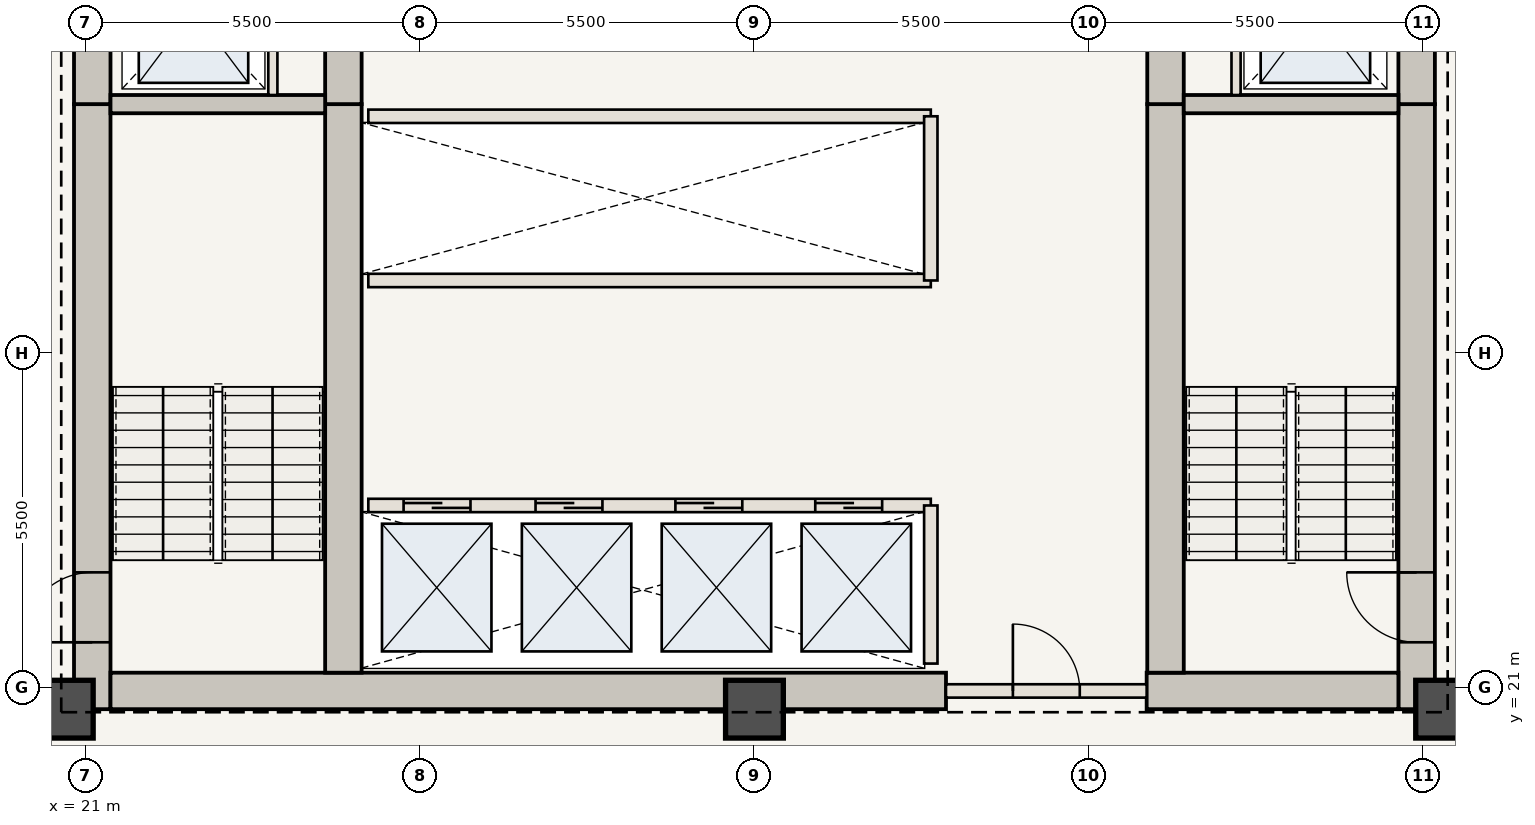
"""IFC4 building model, lengths in metres.
Left out: names, types, materials, properties, quantities, classifications, styles, units other than length and angle.
Written with IfcOpenShell. Run it as: python <this file> out.ifc"""

import sys

from ifc_helpers import new_model, si_unit, direction, frame, frame_2d, origin, origin_2d, place, context, subcontext, project, spatial, rectangle, extrude, element, fill, save


model = new_model("IFC4")
c1 = context("Model", 3, precision=1e-05, world=origin(), true_north=direction((0.0, 1.0)))
c2 = subcontext(c1, "Body", "Model", "MODEL_VIEW")
j1 = project(units=[si_unit("LENGTHUNIT", "METRE"), si_unit("PLANEANGLEUNIT", "RADIAN")], contexts=[c1])
p1 = place(None, origin())
s1 = spatial("IfcSite", under=j1, at=p1, CompositionType="ELEMENT")
p2 = place(p1, origin())
s2 = spatial("IfcBuilding", under=s1, at=p2, CompositionType="ELEMENT")
p3 = place(p2, frame((0.0, 0.0, 172.2)))
s3 = spatial("IfcBuildingStorey", under=s2, at=p3, CompositionType="ELEMENT", Elevation=172.2)
p4 = place(p3, frame((21.11, 20.65, 0.0), z_axis=(0.0, 0.0, 1.0), x_axis=(0.0, 1.0, 0.0)))
e1 = element("IfcWall", 1, at=p4, inside=s3, PredefinedType="SHEAR", context=c2, shape_type="SweptSolid", body=[
    extrude(rectangle(XDim=9.95, YDim=0.6, at=frame_2d((4.975, 0.0))), origin(), (0.0, 0.0, 1.0), 3.85),
])
p5 = place(p4, frame((1.1, 0.0, 0.0)))
e2 = element("IfcOpeningElement", 2, at=p5, cuts=e1, PredefinedType="OPENING", context=c2, shape_type="SweptSolid", body=[
    extrude(rectangle(XDim=1.15, YDim=2.15, at=frame_2d((0.575, 1.075))), frame((0.0, 0.31, 0.0), z_axis=(0.0, -1.0, 0.0), x_axis=(1.0, 0.0, 0.0)), (0.0, 0.0, 1.0), 0.62),
])
p6 = place(p3, frame((21.11, 30.6, 0.0), z_axis=(0.0, 0.0, 1.0), x_axis=(0.0, 1.0, 0.0)))
e3 = element("IfcWall", 3, at=p6, inside=s3, PredefinedType="SHEAR", context=c2, shape_type="SweptSolid", body=[
    extrude(rectangle(XDim=12.7, YDim=0.6, at=frame_2d((6.35, 0.0))), origin(), (0.0, 0.0, 1.0), 3.85),
])
p7 = place(p6, frame((4.2, 0.0, 0.0)))
e4 = element("IfcOpeningElement", 4, at=p7, cuts=e3, PredefinedType="OPENING", context=c2, shape_type="SweptSolid", body=[
    extrude(rectangle(XDim=1.1, YDim=2.15, at=frame_2d((0.55, 1.075))), frame((0.0, 0.31, 0.0), z_axis=(0.0, -1.0, 0.0), x_axis=(1.0, 0.0, 0.0)), (0.0, 0.0, 1.0), 0.62),
])
p8 = place(p6, frame((9.2, 0.0, 0.0)))
e5 = element("IfcOpeningElement", 5, at=p8, cuts=e3, PredefinedType="OPENING", context=c2, shape_type="SweptSolid", body=[
    extrude(rectangle(XDim=0.92, YDim=2.1, at=frame_2d((0.46, 1.05))), frame((0.0, 0.31, 0.0), z_axis=(0.0, -1.0, 0.0), x_axis=(1.0, 0.0, 0.0)), (0.0, 0.0, 1.0), 0.62),
])
p9 = place(p3, frame((42.89, 20.65, 0.0), z_axis=(0.0, 0.0, 1.0), x_axis=(0.0, 1.0, 0.0)))
e6 = element("IfcWall", 6, at=p9, inside=s3, PredefinedType="SHEAR", context=c2, shape_type="SweptSolid", body=[
    extrude(rectangle(XDim=9.95, YDim=0.6, at=frame_2d((4.975, 0.0))), origin(), (0.0, 0.0, 1.0), 3.85),
])
p10 = place(p9, frame((1.1, 0.0, 0.0)))
e7 = element("IfcOpeningElement", 7, at=p10, cuts=e6, PredefinedType="OPENING", context=c2, shape_type="SweptSolid", body=[
    extrude(rectangle(XDim=1.15, YDim=2.15, at=frame_2d((0.575, 1.075))), frame((0.0, 0.31, 0.0), z_axis=(0.0, -1.0, 0.0), x_axis=(1.0, 0.0, 0.0)), (0.0, 0.0, 1.0), 0.62),
])
p11 = place(p3, frame((42.89, 30.6, 0.0), z_axis=(0.0, 0.0, 1.0), x_axis=(0.0, 1.0, 0.0)))
e8 = element("IfcWall", 8, at=p11, inside=s3, PredefinedType="SHEAR", context=c2, shape_type="SweptSolid", body=[
    extrude(rectangle(XDim=12.7, YDim=0.6, at=frame_2d((6.35, 0.0))), origin(), (0.0, 0.0, 1.0), 3.85),
])
p12 = place(p11, frame((4.2, 0.0, 0.0)))
e9 = element("IfcOpeningElement", 9, at=p12, cuts=e8, PredefinedType="OPENING", context=c2, shape_type="SweptSolid", body=[
    extrude(rectangle(XDim=1.1, YDim=2.15, at=frame_2d((0.55, 1.075))), frame((0.0, 0.31, 0.0), z_axis=(0.0, -1.0, 0.0), x_axis=(1.0, 0.0, 0.0)), (0.0, 0.0, 1.0), 0.62),
])
p13 = place(p11, frame((8.05, 0.0, 0.0)))
e10 = element("IfcOpeningElement", 10, at=p13, cuts=e8, PredefinedType="OPENING", context=c2, shape_type="SweptSolid", body=[
    extrude(rectangle(XDim=0.88, YDim=2.1, at=frame_2d((0.44, 1.05))), frame((0.0, 0.31, 0.0), z_axis=(0.0, -1.0, 0.0), x_axis=(1.0, 0.0, 0.0)), (0.0, 0.0, 1.0), 0.62),
])
p14 = place(p11, frame((9.45, 0.0, 0.0)))
e11 = element("IfcOpeningElement", 11, at=p14, cuts=e8, PredefinedType="OPENING", context=c2, shape_type="SweptSolid", body=[
    extrude(rectangle(XDim=0.88, YDim=2.1, at=frame_2d((0.44, 1.05))), frame((0.0, 0.31, 0.0), z_axis=(0.0, -1.0, 0.0), x_axis=(1.0, 0.0, 0.0)), (0.0, 0.0, 1.0), 0.62),
])
p15 = place(p11, frame((10.85, 0.0, 0.0)))
e12 = element("IfcOpeningElement", 12, at=p15, cuts=e8, PredefinedType="OPENING", context=c2, shape_type="SweptSolid", body=[
    extrude(rectangle(XDim=0.88, YDim=2.1, at=frame_2d((0.44, 1.05))), frame((0.0, 0.31, 0.0), z_axis=(0.0, -1.0, 0.0), x_axis=(1.0, 0.0, 0.0)), (0.0, 0.0, 1.0), 0.62),
])
p16 = place(p3, frame((21.41, 20.95, 0.0), z_axis=(0.0, 0.0, 1.0), x_axis=(1.0, 0.0, 0.0)))
e13 = element("IfcWall", 13, at=p16, inside=s3, PredefinedType="SHEAR", context=c2, shape_type="SweptSolid", body=[
    extrude(rectangle(XDim=13.74, YDim=0.6, at=frame_2d((6.87, 0.0))), origin(), (0.0, 0.0, 1.0), 3.85),
])
p17 = place(p3, frame((38.45, 20.95, 0.0), z_axis=(0.0, 0.0, 1.0), x_axis=(1.0, 0.0, 0.0)))
e14 = element("IfcWall", 14, at=p17, inside=s3, PredefinedType="SHEAR", context=c2, shape_type="SweptSolid", body=[
    extrude(rectangle(XDim=4.14, YDim=0.6, at=frame_2d((2.07, 0.0))), origin(), (0.0, 0.0, 1.0), 3.85),
])
p18 = place(p3, frame((25.24, 21.25, 0.0), z_axis=(0.0, 0.0, 1.0), x_axis=(0.0, 1.0, 0.0)))
e15 = element("IfcWall", 15, at=p18, inside=s3, PredefinedType="SHEAR", context=c2, shape_type="SweptSolid", body=[
    extrude(rectangle(XDim=9.35, YDim=0.6, at=frame_2d((4.675, 0.0))), origin(), (0.0, 0.0, 1.0), 3.85),
])
p19 = place(p3, frame((25.24, 30.6, 0.0), z_axis=(0.0, 0.0, 1.0), x_axis=(0.0, 1.0, 0.0)))
e16 = element("IfcWall", 16, at=p19, inside=s3, PredefinedType="SHEAR", context=c2, shape_type="SweptSolid", body=[
    extrude(rectangle(XDim=12.1, YDim=0.6, at=frame_2d((6.05, 0.0))), origin(), (0.0, 0.0, 1.0), 3.85),
])
p20 = place(p19, frame((6.25, 0.0, 0.0)))
e17 = element("IfcOpeningElement", 17, at=p20, cuts=e16, PredefinedType="OPENING", context=c2, shape_type="SweptSolid", body=[
    extrude(rectangle(XDim=1.1, YDim=2.15, at=frame_2d((0.55, 1.075))), frame((0.0, 0.31, 0.0), z_axis=(0.0, -1.0, 0.0), x_axis=(1.0, 0.0, 0.0)), (0.0, 0.0, 1.0), 0.62),
])
p21 = place(p3, frame((38.76, 21.25, 0.0), z_axis=(0.0, 0.0, 1.0), x_axis=(0.0, 1.0, 0.0)))
e18 = element("IfcWall", 18, at=p21, inside=s3, PredefinedType="SHEAR", context=c2, shape_type="SweptSolid", body=[
    extrude(rectangle(XDim=9.35, YDim=0.6, at=frame_2d((4.675, 0.0))), origin(), (0.0, 0.0, 1.0), 3.85),
])
p22 = place(p3, frame((38.76, 30.6, 0.0), z_axis=(0.0, 0.0, 1.0), x_axis=(0.0, 1.0, 0.0)))
e19 = element("IfcWall", 19, at=p22, inside=s3, PredefinedType="SHEAR", context=c2, shape_type="SweptSolid", body=[
    extrude(rectangle(XDim=12.1, YDim=0.6, at=frame_2d((6.05, 0.0))), origin(), (0.0, 0.0, 1.0), 3.85),
])
for number, where, z_axis, x_axis in (
    (20, (20.65, 20.65, 0.0), (0.0, 0.0, 1.0), (1.0, 0.0, 0.0)),
    (21, (32.0, 20.65, 0.0), (0.0, 0.0, 1.0), (1.0, 0.0, 0.0)),
    (22, (43.35, 20.65, 0.0), (0.0, 0.0, 1.0), (1.0, 0.0, 0.0)),
):
    element("IfcColumn", number, at=place(p3, frame(where, z_axis=z_axis, x_axis=x_axis)), inside=s3, PredefinedType="COLUMN", context=c2, shape_type="SweptSolid", body=[
        extrude(rectangle(XDim=0.95, YDim=0.95, at=origin_2d()), origin(), (0.0, 0.0, 1.0), 3.85),
    ])
for number, where, z_axis, x_axis in (
    (23, (21.41, 30.6, 0.0), (0.0, 0.0, 1.0), (1.0, 0.0, 0.0)),
    (24, (39.06, 30.6, 0.0), (0.0, 0.0, 1.0), (1.0, 0.0, 0.0)),
):
    element("IfcWall", number, at=place(p3, frame(where, z_axis=z_axis, x_axis=x_axis)), inside=s3, PredefinedType="SHEAR", context=c2, shape_type="SweptSolid", body=[
        extrude(rectangle(XDim=3.53, YDim=0.3, at=frame_2d((1.765, 0.0))), origin(), (0.0, 0.0, 1.0), 3.43),
    ])
for number, where, z_axis, x_axis in (
    (25, (24.08, 30.75, 0.0), (0.0, 0.0, 1.0), (0.0, 1.0, 0.0)),
    (26, (39.92, 30.75, 0.0), (0.0, 0.0, 1.0), (0.0, 1.0, 0.0)),
):
    element("IfcWall", number, at=place(p3, frame(where, z_axis=z_axis, x_axis=x_axis)), inside=s3, PredefinedType="STANDARD", context=c2, shape_type="SweptSolid", body=[
        extrude(rectangle(XDim=2.65, YDim=0.15, at=frame_2d((1.325, 0.0))), origin(), (0.0, 0.0, 1.0), 3.43),
    ])
p23 = place(p3, frame((35.15, 20.95, 0.0), z_axis=(0.0, 0.0, 1.0), x_axis=(1.0, 0.0, 0.0)))
e27 = element("IfcWall", 27, at=p23, inside=s3, PredefinedType="STANDARD", context=c2, shape_type="SweptSolid", body=[
    extrude(rectangle(XDim=3.3, YDim=0.22, at=frame_2d((1.65, 0.0))), origin(), (0.0, 0.0, 1.0), 3.43),
])
p24 = place(p23, frame((1.1, 0.0, 0.0)))
e28 = element("IfcOpeningElement", 28, at=p24, cuts=e27, PredefinedType="OPENING", context=c2, shape_type="SweptSolid", body=[
    extrude(rectangle(XDim=1.1, YDim=2.15, at=frame_2d((0.55, 1.075))), frame((0.0, 0.12, 0.0), z_axis=(0.0, -1.0, 0.0), x_axis=(1.0, 0.0, 0.0)), (0.0, 0.0, 1.0), 0.24),
])
p25 = place(p3, frame((25.65, 24.0, 0.0), z_axis=(0.0, 0.0, 1.0), x_axis=(1.0, 0.0, 0.0)))
e29 = element("IfcWall", 29, at=p25, inside=s3, PredefinedType="STANDARD", context=c2, shape_type="SweptSolid", body=[
    extrude(rectangle(XDim=9.25, YDim=0.22, at=frame_2d((4.625, 0.0))), origin(), (0.0, 0.0, 1.0), 3.43),
])
p26 = place(p25, frame((0.58, 0.0, 0.0)))
e30 = element("IfcOpeningElement", 30, at=p26, cuts=e29, PredefinedType="OPENING", context=c2, shape_type="SweptSolid", body=[
    extrude(rectangle(XDim=1.1, YDim=2.15, at=frame_2d((0.55, 1.075))), frame((0.0, 0.12, 0.0), z_axis=(0.0, -1.0, 0.0), x_axis=(1.0, 0.0, 0.0)), (0.0, 0.0, 1.0), 0.24),
])
p27 = place(p25, frame((2.75, 0.0, 0.0)))
e31 = element("IfcOpeningElement", 31, at=p27, cuts=e29, PredefinedType="OPENING", context=c2, shape_type="SweptSolid", body=[
    extrude(rectangle(XDim=1.1, YDim=2.15, at=frame_2d((0.55, 1.075))), frame((0.0, 0.12, 0.0), z_axis=(0.0, -1.0, 0.0), x_axis=(1.0, 0.0, 0.0)), (0.0, 0.0, 1.0), 0.24),
])
p28 = place(p25, frame((5.05, 0.0, 0.0)))
e32 = element("IfcOpeningElement", 32, at=p28, cuts=e29, PredefinedType="OPENING", context=c2, shape_type="SweptSolid", body=[
    extrude(rectangle(XDim=1.1, YDim=2.15, at=frame_2d((0.55, 1.075))), frame((0.0, 0.12, 0.0), z_axis=(0.0, -1.0, 0.0), x_axis=(1.0, 0.0, 0.0)), (0.0, 0.0, 1.0), 0.24),
])
p29 = place(p25, frame((7.35, 0.0, 0.0)))
e33 = element("IfcOpeningElement", 33, at=p29, cuts=e29, PredefinedType="OPENING", context=c2, shape_type="SweptSolid", body=[
    extrude(rectangle(XDim=1.1, YDim=2.15, at=frame_2d((0.55, 1.075))), frame((0.0, 0.12, 0.0), z_axis=(0.0, -1.0, 0.0), x_axis=(1.0, 0.0, 0.0)), (0.0, 0.0, 1.0), 0.24),
])
p30 = place(p3, frame((34.9, 21.4, 0.0), z_axis=(0.0, 0.0, 1.0), x_axis=(0.0, 1.0, 0.0)))
e34 = element("IfcWall", 34, at=p30, inside=s3, PredefinedType="STANDARD", context=c2, shape_type="SweptSolid", body=[
    extrude(rectangle(XDim=2.6, YDim=0.22, at=frame_2d((1.3, 0.0))), origin(), (0.0, 0.0, 1.0), 3.43),
])
for number, where, z_axis, x_axis in (
    (35, (25.65, 27.7, 0.0), (0.0, 0.0, 1.0), (1.0, 0.0, 0.0)),
    (36, (25.65, 30.4, 0.0), (0.0, 0.0, 1.0), (1.0, 0.0, 0.0)),
):
    element("IfcWall", number, at=place(p3, frame(where, z_axis=z_axis, x_axis=x_axis)), inside=s3, PredefinedType="STANDARD", context=c2, shape_type="SweptSolid", body=[
        extrude(rectangle(XDim=9.25, YDim=0.22, at=frame_2d((4.625, 0.0))), origin(), (0.0, 0.0, 1.0), 3.43),
    ])
p31 = place(p3, frame((34.9, 27.7, 0.0), z_axis=(0.0, 0.0, 1.0), x_axis=(0.0, 1.0, 0.0)))
e37 = element("IfcWall", 37, at=p31, inside=s3, PredefinedType="STANDARD", context=c2, shape_type="SweptSolid", body=[
    extrude(rectangle(XDim=2.7, YDim=0.22, at=frame_2d((1.35, 0.0))), origin(), (0.0, 0.0, 1.0), 3.43),
])
p32 = place(p5, origin())
e38 = element("IfcDoor", 38, at=p32, inside=s3, OperationType="SINGLE_SWING_LEFT", PredefinedType="DOOR", context=c2, shape_type="SweptSolid", body=[
    extrude(rectangle(XDim=1.15, YDim=2.15, at=frame_2d((0.575, 1.075))), frame((0.0, 0.025, 0.0), z_axis=(0.0, -1.0, 0.0), x_axis=(1.0, 0.0, 0.0)), (0.0, 0.0, 1.0), 0.05),
])
fill(e2, e38)
p33 = place(p10, origin())
e39 = element("IfcDoor", 39, at=p33, inside=s3, OperationType="SINGLE_SWING_RIGHT", PredefinedType="DOOR", context=c2, shape_type="SweptSolid", body=[
    extrude(rectangle(XDim=1.15, YDim=2.15, at=frame_2d((0.575, 1.075))), frame((0.0, 0.025, 0.0), z_axis=(0.0, -1.0, 0.0), x_axis=(1.0, 0.0, 0.0)), (0.0, 0.0, 1.0), 0.05),
])
fill(e7, e39)
p34 = place(p24, origin())
e40 = element("IfcDoor", 40, at=p34, inside=s3, OperationType="SINGLE_SWING_LEFT", PredefinedType="DOOR", context=c2, shape_type="SweptSolid", body=[
    extrude(rectangle(XDim=1.1, YDim=2.15, at=frame_2d((0.55, 1.075))), frame((0.0, 0.025, 0.0), z_axis=(0.0, -1.0, 0.0), x_axis=(1.0, 0.0, 0.0)), (0.0, 0.0, 1.0), 0.05),
])
fill(e28, e40)
p35 = place(p26, origin())
e41 = element("IfcDoor", 41, at=p35, inside=s3, OperationType="DOUBLE_DOOR_SLIDING", PredefinedType="DOOR", context=c2, shape_type="SweptSolid", body=[
    extrude(rectangle(XDim=1.1, YDim=2.15, at=frame_2d((0.55, 1.075))), frame((0.0, 0.025, 0.0), z_axis=(0.0, -1.0, 0.0), x_axis=(1.0, 0.0, 0.0)), (0.0, 0.0, 1.0), 0.05),
])
fill(e30, e41)
p36 = place(p27, origin())
e42 = element("IfcDoor", 42, at=p36, inside=s3, OperationType="DOUBLE_DOOR_SLIDING", PredefinedType="DOOR", context=c2, shape_type="SweptSolid", body=[
    extrude(rectangle(XDim=1.1, YDim=2.15, at=frame_2d((0.55, 1.075))), frame((0.0, 0.025, 0.0), z_axis=(0.0, -1.0, 0.0), x_axis=(1.0, 0.0, 0.0)), (0.0, 0.0, 1.0), 0.05),
])
fill(e31, e42)
p37 = place(p28, origin())
e43 = element("IfcDoor", 43, at=p37, inside=s3, OperationType="DOUBLE_DOOR_SLIDING", PredefinedType="DOOR", context=c2, shape_type="SweptSolid", body=[
    extrude(rectangle(XDim=1.1, YDim=2.15, at=frame_2d((0.55, 1.075))), frame((0.0, 0.025, 0.0), z_axis=(0.0, -1.0, 0.0), x_axis=(1.0, 0.0, 0.0)), (0.0, 0.0, 1.0), 0.05),
])
fill(e32, e43)
p38 = place(p29, origin())
e44 = element("IfcDoor", 44, at=p38, inside=s3, OperationType="DOUBLE_DOOR_SLIDING", PredefinedType="DOOR", context=c2, shape_type="SweptSolid", body=[
    extrude(rectangle(XDim=1.1, YDim=2.15, at=frame_2d((0.55, 1.075))), frame((0.0, 0.025, 0.0), z_axis=(0.0, -1.0, 0.0), x_axis=(1.0, 0.0, 0.0)), (0.0, 0.0, 1.0), 0.05),
])
fill(e33, e44)
save(model, sys.argv[1])
